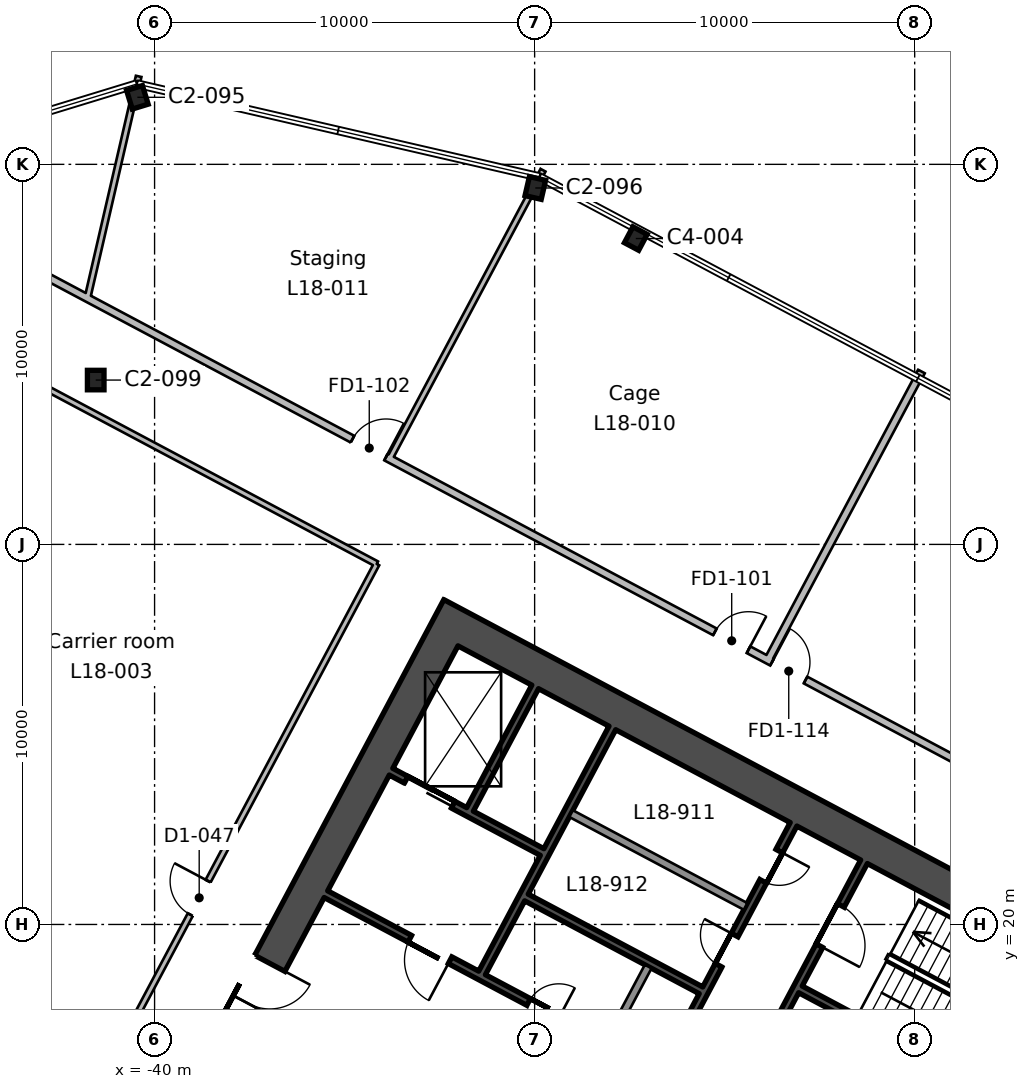
"""IFC4 building model, lengths in metres.
Left out: names, types, materials, properties, quantities, classifications, styles, units other than length and angle.
Written with IfcOpenShell. Run it as: python <this file> out.ifc"""

import sys

from ifc_helpers import new_model, si_unit, direction, frame, frame_2d, origin, origin_2d, place, context, subcontext, project, spatial, rectangle, i_section, extrude, element, fill, save


model = new_model("IFC4")
c1 = context("Model", 3, precision=1e-05, world=origin(), true_north=direction((0.0, 1.0)))
c2 = subcontext(c1, "Body", "Model", "MODEL_VIEW")
j1 = project(units=[si_unit("LENGTHUNIT", "METRE"), si_unit("PLANEANGLEUNIT", "RADIAN")], contexts=[c1])
p1 = place(None, origin())
s1 = spatial("IfcSite", under=j1, at=p1, CompositionType="ELEMENT")
p2 = place(p1, origin())
s2 = spatial("IfcBuilding", under=s1, at=p2, CompositionType="ELEMENT")
p3 = place(p2, frame((0.0, 0.0, 93.8)))
s3 = spatial("IfcBuildingStorey", under=s2, at=p3, CompositionType="ELEMENT", Elevation=93.8)
p4 = place(p3, frame((-41.549, 34.324, 0.0), z_axis=(0.0, 0.0, 1.0), x_axis=(1.0, 0.0, 0.0)))
e1 = element("IfcColumn", 1, at=p4, inside=s3, PredefinedType="COLUMN", context=c2, shape_type="SweptSolid", body=[
    extrude(i_section(OverallWidth=0.437, OverallDepth=0.513, WebThickness=0.061, FlangeThickness=0.097, FilletRadius=0.015, at=origin_2d()), origin(), (0.0, 0.0, 1.0), 4.6),
])
p5 = place(p3, frame((-27.338, 38.048, 0.0), z_axis=(0.0, 0.0, 1.0), x_axis=(-0.882947592859, 0.469471562786, 0.0)))
e2 = element("IfcColumn", 2, at=p5, inside=s3, PredefinedType="COLUMN", context=c2, shape_type="SweptSolid", body=[
    extrude(i_section(OverallWidth=0.424, OverallDepth=0.475, WebThickness=0.048, FlangeThickness=0.077, FilletRadius=0.015, at=origin_2d()), origin(), (0.0, 0.0, 1.0), 4.6),
])
for number, where, z_axis, x_axis in (
    (3, (-29.982, 39.378, 0.0), (0.0, 0.0, 1.0), (-0.974, 0.225, 0.0)),
    (4, (-40.453, 41.764, 0.0), (0.0, 0.0, 1.0), (-0.956, -0.292, 0.0)),
):
    element("IfcColumn", number, at=place(p3, frame(where, z_axis=z_axis, x_axis=x_axis)), inside=s3, PredefinedType="COLUMN", context=c2, shape_type="SweptSolid", body=[
        extrude(i_section(OverallWidth=0.437, OverallDepth=0.513, WebThickness=0.061, FlangeThickness=0.097, FilletRadius=0.015, at=origin_2d()), origin(), (0.0, 0.0, 1.0), 4.6),
    ])
p6 = place(p3, frame((-13.362, 18.43, 0.0), z_axis=(0.0, 0.0, 1.0), x_axis=(-0.46947084998, -0.882947971864, 0.0)))
e5 = element("IfcWall", 5, at=p6, inside=s3, PredefinedType="SHEAR", context=c2, shape_type="SweptSolid", body=[
    extrude(rectangle(XDim=20.0, YDim=0.9, at=frame_2d((10.0, 0.0))), origin(), (0.0, 0.0, 1.0), 4.6),
])
p7 = place(p6, frame((7.0, 0.0, 0.0)))
e6 = element("IfcOpeningElement", 6, at=p7, cuts=e5, PredefinedType="OPENING", context=c2, shape_type="SweptSolid", body=[
    extrude(rectangle(XDim=2.4, YDim=2.4, at=frame_2d((1.2, 1.2))), frame((0.0, 0.46, 0.0), z_axis=(0.0, -1.0, 0.0), x_axis=(1.0, 0.0, 0.0)), (0.0, 0.0, 1.0), 0.92),
])
p8 = place(p3, frame((-31.992, 28.336, 0.0), z_axis=(0.0, 0.0, 1.0), x_axis=(-0.46947084998, -0.882947971864, 0.0)))
e7 = element("IfcWall", 7, at=p8, inside=s3, PredefinedType="SHEAR", context=c2, shape_type="SweptSolid", body=[
    extrude(rectangle(XDim=20.0, YDim=0.9, at=frame_2d((10.0, 0.0))), origin(), (0.0, 0.0, 1.0), 4.6),
])
p9 = place(p8, frame((10.6, 0.0, 0.0)))
e8 = element("IfcOpeningElement", 8, at=p9, cuts=e7, PredefinedType="OPENING", context=c2, shape_type="SweptSolid", body=[
    extrude(rectangle(XDim=2.4, YDim=2.4, at=frame_2d((1.2, 1.2))), frame((0.0, 0.46, 0.0), z_axis=(0.0, -1.0, 0.0), x_axis=(1.0, 0.0, 0.0)), (0.0, 0.0, 1.0), 0.92),
])
p10 = place(p3, frame((-13.97, 18.244, 0.0), z_axis=(0.0, 0.0, 1.0), x_axis=(-0.88294509198, 0.469476266226, 0.0)))
e9 = element("IfcWall", 9, at=p10, inside=s3, PredefinedType="SHEAR", context=c2, shape_type="SweptSolid", body=[
    extrude(rectangle(XDim=20.2, YDim=0.9, at=frame_2d((10.1, 0.0))), origin(), (0.0, 0.0, 1.0), 4.6),
])
p11 = place(p3, frame((-21.333, 21.649, 0.0), z_axis=(0.0, 0.0, 1.0), x_axis=(-0.469494272526, -0.882935517501, 0.0)))
e10 = element("IfcWall", 10, at=p11, inside=s3, PredefinedType="SHEAR", context=c2, shape_type="SweptSolid", body=[
    extrude(rectangle(XDim=7.3, YDim=0.2, at=frame_2d((3.65, 0.0))), origin(), (0.0, 0.0, 1.0), 4.6),
])
p12 = place(p11, frame((1.3, 0.0, 0.0)))
e11 = element("IfcOpeningElement", 11, at=p12, cuts=e10, PredefinedType="OPENING", context=c2, shape_type="SweptSolid", body=[
    extrude(rectangle(XDim=1.2, YDim=2.1, at=frame_2d((0.6, 1.05))), frame((0.0, 0.11, 0.0), z_axis=(0.0, -1.0, 0.0), x_axis=(1.0, 0.0, 0.0)), (0.0, 0.0, 1.0), 0.22),
])
p13 = place(p3, frame((-23.188, 22.635, 0.0), z_axis=(0.0, 0.0, 1.0), x_axis=(-0.469454336211, -0.882956752176, 0.0)))
e12 = element("IfcWall", 12, at=p13, inside=s3, PredefinedType="SHEAR", context=c2, shape_type="SweptSolid", body=[
    extrude(rectangle(XDim=7.3, YDim=0.2, at=frame_2d((3.65, 0.0))), origin(), (0.0, 0.0, 1.0), 4.6),
])
p14 = place(p13, frame((0.8, 0.0, 0.0)))
e13 = element("IfcOpeningElement", 13, at=p14, cuts=e12, PredefinedType="OPENING", context=c2, shape_type="SweptSolid", body=[
    extrude(rectangle(XDim=0.9, YDim=2.1, at=frame_2d((0.45, 1.05))), frame((0.0, 0.11, 0.0), z_axis=(0.0, -1.0, 0.0), x_axis=(1.0, 0.0, 0.0)), (0.0, 0.0, 1.0), 0.22),
])
p15 = place(p13, frame((3.3, 0.0, 0.0)))
e14 = element("IfcOpeningElement", 14, at=p15, cuts=e12, PredefinedType="OPENING", context=c2, shape_type="SweptSolid", body=[
    extrude(rectangle(XDim=0.9, YDim=2.1, at=frame_2d((0.45, 1.05))), frame((0.0, 0.11, 0.0), z_axis=(0.0, -1.0, 0.0), x_axis=(1.0, 0.0, 0.0)), (0.0, 0.0, 1.0), 0.22),
])
p16 = place(p3, frame((-27.012, 18.893, 0.0), z_axis=(0.0, 0.0, 1.0), x_axis=(-0.4694473164, -0.882960484464, 0.0)))
e15 = element("IfcWall", 15, at=p16, inside=s3, PredefinedType="SOLIDWALL", context=c2, shape_type="SweptSolid", body=[
    extrude(rectangle(XDim=2.2, YDim=0.2, at=frame_2d((1.1, 0.0))), origin(), (0.0, 0.0, 1.0), 4.6),
])
p17 = place(p3, frame((-27.955, 25.171, 0.0), z_axis=(0.0, 0.0, 1.0), x_axis=(-0.469480409012, -0.88294288918, 0.0)))
e16 = element("IfcWall", 16, at=p17, inside=s3, PredefinedType="SHEAR", context=c2, shape_type="SweptSolid", body=[
    extrude(rectangle(XDim=7.3, YDim=0.2, at=frame_2d((3.65, 0.0))), origin(), (0.0, 0.0, 1.0), 4.6),
])
p18 = place(p3, frame((-29.986, 26.25, 0.0), z_axis=(0.0, 0.0, 1.0), x_axis=(-0.469494272526, -0.882935517501, 0.0)))
e17 = element("IfcWall", 17, at=p18, inside=s3, PredefinedType="SHEAR", context=c2, shape_type="SweptSolid", body=[
    extrude(rectangle(XDim=3.65, YDim=0.2, at=frame_2d((1.825, 0.0))), origin(), (0.0, 0.0, 1.0), 4.6),
])
p19 = place(p3, frame((-24.449, 20.475, 0.0), z_axis=(0.0, 0.0, 1.0), x_axis=(-0.882934506056, 0.469496174655, 0.0)))
e18 = element("IfcWall", 18, at=p19, inside=s3, PredefinedType="SOLIDWALL", context=c2, shape_type="SweptSolid", body=[
    extrude(rectangle(XDim=5.2, YDim=0.2, at=frame_2d((2.6, 0.0))), origin(), (0.0, 0.0, 1.0), 4.6),
])
p20 = place(p3, frame((-15.942, 14.536, 0.0), z_axis=(0.0, 0.0, 1.0), x_axis=(-0.882946947542, 0.469472776449, 0.0)))
e19 = element("IfcWall", 19, at=p20, inside=s3, PredefinedType="SHEAR", context=c2, shape_type="SweptSolid", body=[
    extrude(rectangle(XDim=8.0, YDim=0.2, at=frame_2d((4.0, 0.0))), origin(), (0.0, 0.0, 1.0), 4.6),
])
p21 = place(p3, frame((-29.804, 21.906, 0.0), z_axis=(0.0, 0.0, 1.0), x_axis=(-0.882960433586, 0.469447412093, 0.0)))
e20 = element("IfcWall", 20, at=p21, inside=s3, PredefinedType="SHEAR", context=c2, shape_type="SweptSolid", body=[
    extrude(rectangle(XDim=4.5, YDim=0.2, at=frame_2d((2.25, 0.0))), origin(), (0.0, 0.0, 1.0), 4.6),
])
p22 = place(p21, frame((2.65, 0.0, 0.0)))
e21 = element("IfcOpeningElement", 21, at=p22, cuts=e20, PredefinedType="OPENING", context=c2, shape_type="SweptSolid", body=[
    extrude(rectangle(XDim=1.4, YDim=2.4, at=frame_2d((0.7, 1.2))), frame((0.0, 0.11, 0.0), z_axis=(0.0, -1.0, 0.0), x_axis=(1.0, 0.0, 0.0)), (0.0, 0.0, 1.0), 0.22),
])
p23 = place(p3, frame((-25.623, 18.268, 0.0), z_axis=(0.0, 0.0, 1.0), x_axis=(-0.882953967957, 0.469459572775, 0.0)))
e22 = element("IfcWall", 22, at=p23, inside=s3, PredefinedType="SHEAR", context=c2, shape_type="SweptSolid", body=[
    extrude(rectangle(XDim=5.2, YDim=0.2, at=frame_2d((2.6, 0.0))), origin(), (0.0, 0.0, 1.0), 4.6),
])
p24 = place(p3, frame((-26.662, 16.102, 0.0), z_axis=(0.0, 0.0, 1.0), x_axis=(-0.882940221191, 0.469485426614, 0.0)))
e23 = element("IfcWall", 23, at=p24, inside=s3, PredefinedType="SHEAR", context=c2, shape_type="SweptSolid", body=[
    extrude(rectangle(XDim=10.0, YDim=0.2, at=frame_2d((5.0, 0.0))), origin(), (0.0, 0.0, 1.0), 4.6),
])
p25 = place(p24, frame((6.3, 0.0, 0.0)))
e24 = element("IfcOpeningElement", 24, at=p25, cuts=e23, PredefinedType="OPENING", context=c2, shape_type="SweptSolid", body=[
    extrude(rectangle(XDim=1.2, YDim=2.1, at=frame_2d((0.6, 1.05))), frame((0.0, 0.11, 0.0), z_axis=(0.0, -1.0, 0.0), x_axis=(1.0, 0.0, 0.0)), (0.0, 0.0, 1.0), 0.22),
])
p26 = place(p24, frame((0.36, 0.0, 0.0)))
e25 = element("IfcOpeningElement", 25, at=p26, cuts=e23, PredefinedType="OPENING", context=c2, shape_type="SweptSolid", body=[
    extrude(rectangle(XDim=0.9, YDim=2.1, at=frame_2d((0.45, 1.05))), frame((0.0, 0.11, 0.0), z_axis=(0.0, -1.0, 0.0), x_axis=(1.0, 0.0, 0.0)), (0.0, 0.0, 1.0), 0.22),
])
p27 = place(p24, frame((3.06, 0.0, 0.0)))
e26 = element("IfcOpeningElement", 26, at=p27, cuts=e23, PredefinedType="OPENING", context=c2, shape_type="SweptSolid", body=[
    extrude(rectangle(XDim=0.9, YDim=2.1, at=frame_2d((0.45, 1.05))), frame((0.0, 0.11, 0.0), z_axis=(0.0, -1.0, 0.0), x_axis=(1.0, 0.0, 0.0)), (0.0, 0.0, 1.0), 0.22),
])
p28 = place(p3, frame((-42.984, 34.181, 0.0), z_axis=(0.0, 0.0, 1.0), x_axis=(0.882929457898, -0.469505668097, 0.0)))
e27 = element("IfcWall", 27, at=p28, inside=s3, PredefinedType="PARTITIONING", context=c2, shape_type="SweptSolid", body=[
    extrude(rectangle(XDim=10.0, YDim=0.15, at=frame_2d((5.0, 0.0))), origin(), (0.0, 0.0, 1.0), 4.2),
])
p29 = place(p3, frame((-34.155, 29.486, 0.0), z_axis=(0.0, 0.0, 1.0), x_axis=(-0.469446756585, -0.882960782103, 0.0)))
e28 = element("IfcWall", 28, at=p29, inside=s3, PredefinedType="PARTITIONING", context=c2, shape_type="SweptSolid", body=[
    extrude(rectangle(XDim=20.0, YDim=0.15, at=frame_2d((10.0, 0.0))), origin(), (0.0, 0.0, 1.0), 4.2),
])
p30 = place(p29, frame((9.45, 0.0, 0.0)))
e29 = element("IfcOpeningElement", 29, at=p30, cuts=e28, PredefinedType="OPENING", context=c2, shape_type="SweptSolid", body=[
    extrude(rectangle(XDim=1.0, YDim=2.1, at=frame_2d((0.5, 1.05))), frame((0.0, 0.085, 0.0), z_axis=(0.0, -1.0, 0.0), x_axis=(1.0, 0.0, 0.0)), (0.0, 0.0, 1.0), 0.17),
])
p31 = place(p3, frame((-48.271, 39.936, 0.0), z_axis=(0.0, 0.0, 1.0), x_axis=(0.88294856545, -0.469469733604, 0.0)))
e30 = element("IfcWall", 30, at=p31, inside=s3, PredefinedType="PARTITIONING", context=c2, shape_type="SweptSolid", body=[
    extrude(rectangle(XDim=54.67, YDim=0.2, at=frame_2d((27.335, 0.0))), origin(), (0.0, 0.0, 1.0), 4.2),
])
p32 = place(p31, frame((27.766, 0.0, 0.0)))
e31 = element("IfcOpeningElement", 31, at=p32, cuts=e30, PredefinedType="OPENING", context=c2, shape_type="SweptSolid", body=[
    extrude(rectangle(XDim=1.0, YDim=2.1, at=frame_2d((0.5, 1.05))), frame((0.0, 0.11, 0.0), z_axis=(0.0, -1.0, 0.0), x_axis=(1.0, 0.0, 0.0)), (0.0, 0.0, 1.0), 0.22),
])
p33 = place(p31, frame((26.066, 0.0, 0.0)))
e32 = element("IfcOpeningElement", 32, at=p33, cuts=e30, PredefinedType="OPENING", context=c2, shape_type="SweptSolid", body=[
    extrude(rectangle(XDim=1.0, YDim=2.1, at=frame_2d((0.5, 1.05))), frame((0.0, 0.11, 0.0), z_axis=(0.0, -1.0, 0.0), x_axis=(1.0, 0.0, 0.0)), (0.0, 0.0, 1.0), 0.22),
])
p34 = place(p31, frame((15.265, 0.0, 0.0)))
e33 = element("IfcOpeningElement", 33, at=p34, cuts=e30, PredefinedType="OPENING", context=c2, shape_type="SweptSolid", body=[
    extrude(rectangle(XDim=1.0, YDim=2.1, at=frame_2d((0.5, 1.05))), frame((0.0, 0.11, 0.0), z_axis=(0.0, -1.0, 0.0), x_axis=(1.0, 0.0, 0.0)), (0.0, 0.0, 1.0), 0.22),
])
p35 = place(p3, frame((-29.779, 39.846, 0.0), z_axis=(0.0, 0.0, 1.0), x_axis=(-0.469428442388, -0.882970519031, 0.0)))
e34 = element("IfcWall", 34, at=p35, inside=s3, PredefinedType="PARTITIONING", context=c2, shape_type="SweptSolid", body=[
    extrude(rectangle(XDim=8.602, YDim=0.15, at=frame_2d((4.301, 0.0))), origin(), (0.0, 0.0, 1.0), 4.2),
])
p36 = place(p3, frame((-41.767, 36.478, 0.0), z_axis=(0.0, 0.0, 1.0), x_axis=(0.225044040813, 0.974348592494, 0.0)))
e35 = element("IfcWall", 35, at=p36, inside=s3, PredefinedType="PARTITIONING", context=c2, shape_type="SweptSolid", body=[
    extrude(rectangle(XDim=5.99, YDim=0.15, at=frame_2d((2.995, 0.0))), origin(), (0.0, 0.0, 1.0), 4.2),
])
p37 = place(p3, frame((-19.822, 34.55, 0.0), z_axis=(0.0, 0.0, 1.0), x_axis=(-0.469434046176, -0.882967539772, 0.0)))
e36 = element("IfcWall", 36, at=p37, inside=s3, PredefinedType="PARTITIONING", context=c2, shape_type="SweptSolid", body=[
    extrude(rectangle(XDim=8.599, YDim=0.2, at=frame_2d((4.3, 0.0))), origin(), (0.0, 0.0, 1.0), 4.2),
])
p38 = place(p9, origin())
e37 = element("IfcDoor", 37, at=p38, inside=s3, OperationType="DOUBLE_DOOR_SINGLE_SWING", PredefinedType="DOOR", context=c2, shape_type="SweptSolid", body=[
    extrude(rectangle(XDim=2.4, YDim=2.4, at=frame_2d((1.2, 1.2))), frame((0.0, 0.025, 0.0), z_axis=(0.0, -1.0, 0.0), x_axis=(1.0, 0.0, 0.0)), (0.0, 0.0, 1.0), 0.05),
])
fill(e8, e37)
p39 = place(p25, origin())
e38 = element("IfcDoor", 38, at=p39, inside=s3, OperationType="SINGLE_SWING_LEFT", PredefinedType="DOOR", context=c2, shape_type="SweptSolid", body=[
    extrude(rectangle(XDim=1.2, YDim=2.1, at=frame_2d((0.6, 1.05))), frame((0.0, 0.025, 0.0), z_axis=(0.0, -1.0, 0.0), x_axis=(1.0, 0.0, 0.0)), (0.0, 0.0, 1.0), 0.05),
])
fill(e24, e38)
p40 = place(p12, origin())
e39 = element("IfcDoor", 39, at=p40, inside=s3, OperationType="SINGLE_SWING_RIGHT", PredefinedType="DOOR", context=c2, shape_type="SweptSolid", body=[
    extrude(rectangle(XDim=1.2, YDim=2.1, at=frame_2d((0.6, 1.05))), frame((0.0, 0.025, 0.0), z_axis=(0.0, -1.0, 0.0), x_axis=(1.0, 0.0, 0.0)), (0.0, 0.0, 1.0), 0.05),
])
fill(e11, e39)
p41 = place(p27, frame((0.9, 0.0, 0.0), z_axis=(0.0, 0.0, 1.0), x_axis=(-1.0, 0.0, 0.0)))
e40 = element("IfcDoor", 40, at=p41, inside=s3, OperationType="SINGLE_SWING_RIGHT", PredefinedType="DOOR", context=c2, shape_type="SweptSolid", body=[
    extrude(rectangle(XDim=0.9, YDim=2.1, at=frame_2d((0.45, 1.05))), frame((0.0, 0.025, 0.0), z_axis=(0.0, -1.0, 0.0), x_axis=(1.0, 0.0, 0.0)), (0.0, 0.0, 1.0), 0.05),
])
fill(e26, e40)
p42 = place(p22, origin())
e41 = element("IfcDoor", 41, at=p42, inside=s3, OperationType="DOUBLE_DOOR_SLIDING", PredefinedType="DOOR", context=c2, shape_type="SweptSolid", body=[
    extrude(rectangle(XDim=1.4, YDim=2.4, at=frame_2d((0.7, 1.2))), frame((0.0, 0.025, 0.0), z_axis=(0.0, -1.0, 0.0), x_axis=(1.0, 0.0, 0.0)), (0.0, 0.0, 1.0), 0.05),
])
fill(e21, e41)
p43 = place(p14, origin())
e42 = element("IfcDoor", 42, at=p43, inside=s3, OperationType="SINGLE_SWING_LEFT", PredefinedType="DOOR", context=c2, shape_type="SweptSolid", body=[
    extrude(rectangle(XDim=0.9, YDim=2.1, at=frame_2d((0.45, 1.05))), frame((0.0, 0.025, 0.0), z_axis=(0.0, -1.0, 0.0), x_axis=(1.0, 0.0, 0.0)), (0.0, 0.0, 1.0), 0.05),
])
fill(e13, e42)
p44 = place(p15, frame((0.9, 0.0, 0.0), z_axis=(0.0, 0.0, 1.0), x_axis=(-1.0, 0.0, 0.0)))
e43 = element("IfcDoor", 43, at=p44, inside=s3, OperationType="SINGLE_SWING_RIGHT", PredefinedType="DOOR", context=c2, shape_type="SweptSolid", body=[
    extrude(rectangle(XDim=0.9, YDim=2.1, at=frame_2d((0.45, 1.05))), frame((0.0, 0.025, 0.0), z_axis=(0.0, -1.0, 0.0), x_axis=(1.0, 0.0, 0.0)), (0.0, 0.0, 1.0), 0.05),
])
fill(e14, e43)
p45 = place(p30, frame((1.0, 0.0, 0.0), z_axis=(0.0, 0.0, 1.0), x_axis=(-1.0, 0.0, 0.0)))
e44 = element("IfcDoor", 44, at=p45, inside=s3, OperationType="SINGLE_SWING_RIGHT", PredefinedType="DOOR", context=c2, shape_type="SweptSolid", body=[
    extrude(rectangle(XDim=1.0, YDim=2.1, at=frame_2d((0.5, 1.05))), frame((0.0, 0.025, 0.0), z_axis=(0.0, -1.0, 0.0), x_axis=(1.0, 0.0, 0.0)), (0.0, 0.0, 1.0), 0.05),
])
fill(e29, e44)
p46 = place(p32, origin())
e45 = element("IfcDoor", 45, at=p46, inside=s3, OperationType="SINGLE_SWING_LEFT", PredefinedType="DOOR", context=c2, shape_type="SweptSolid", body=[
    extrude(rectangle(XDim=1.0, YDim=2.1, at=frame_2d((0.5, 1.05))), frame((0.0, 0.025, 0.0), z_axis=(0.0, -1.0, 0.0), x_axis=(1.0, 0.0, 0.0)), (0.0, 0.0, 1.0), 0.05),
])
fill(e31, e45)
p47 = place(p33, origin())
e46 = element("IfcDoor", 46, at=p47, inside=s3, OperationType="SINGLE_SWING_RIGHT", PredefinedType="DOOR", context=c2, shape_type="SweptSolid", body=[
    extrude(rectangle(XDim=1.0, YDim=2.1, at=frame_2d((0.5, 1.05))), frame((0.0, 0.025, 0.0), z_axis=(0.0, -1.0, 0.0), x_axis=(1.0, 0.0, 0.0)), (0.0, 0.0, 1.0), 0.05),
])
fill(e32, e46)
p48 = place(p34, origin())
e47 = element("IfcDoor", 47, at=p48, inside=s3, OperationType="SINGLE_SWING_RIGHT", PredefinedType="DOOR", context=c2, shape_type="SweptSolid", body=[
    extrude(rectangle(XDim=1.0, YDim=2.1, at=frame_2d((0.5, 1.05))), frame((0.0, 0.025, 0.0), z_axis=(0.0, -1.0, 0.0), x_axis=(1.0, 0.0, 0.0)), (0.0, 0.0, 1.0), 0.05),
])
fill(e33, e47)
save(model, sys.argv[1])
